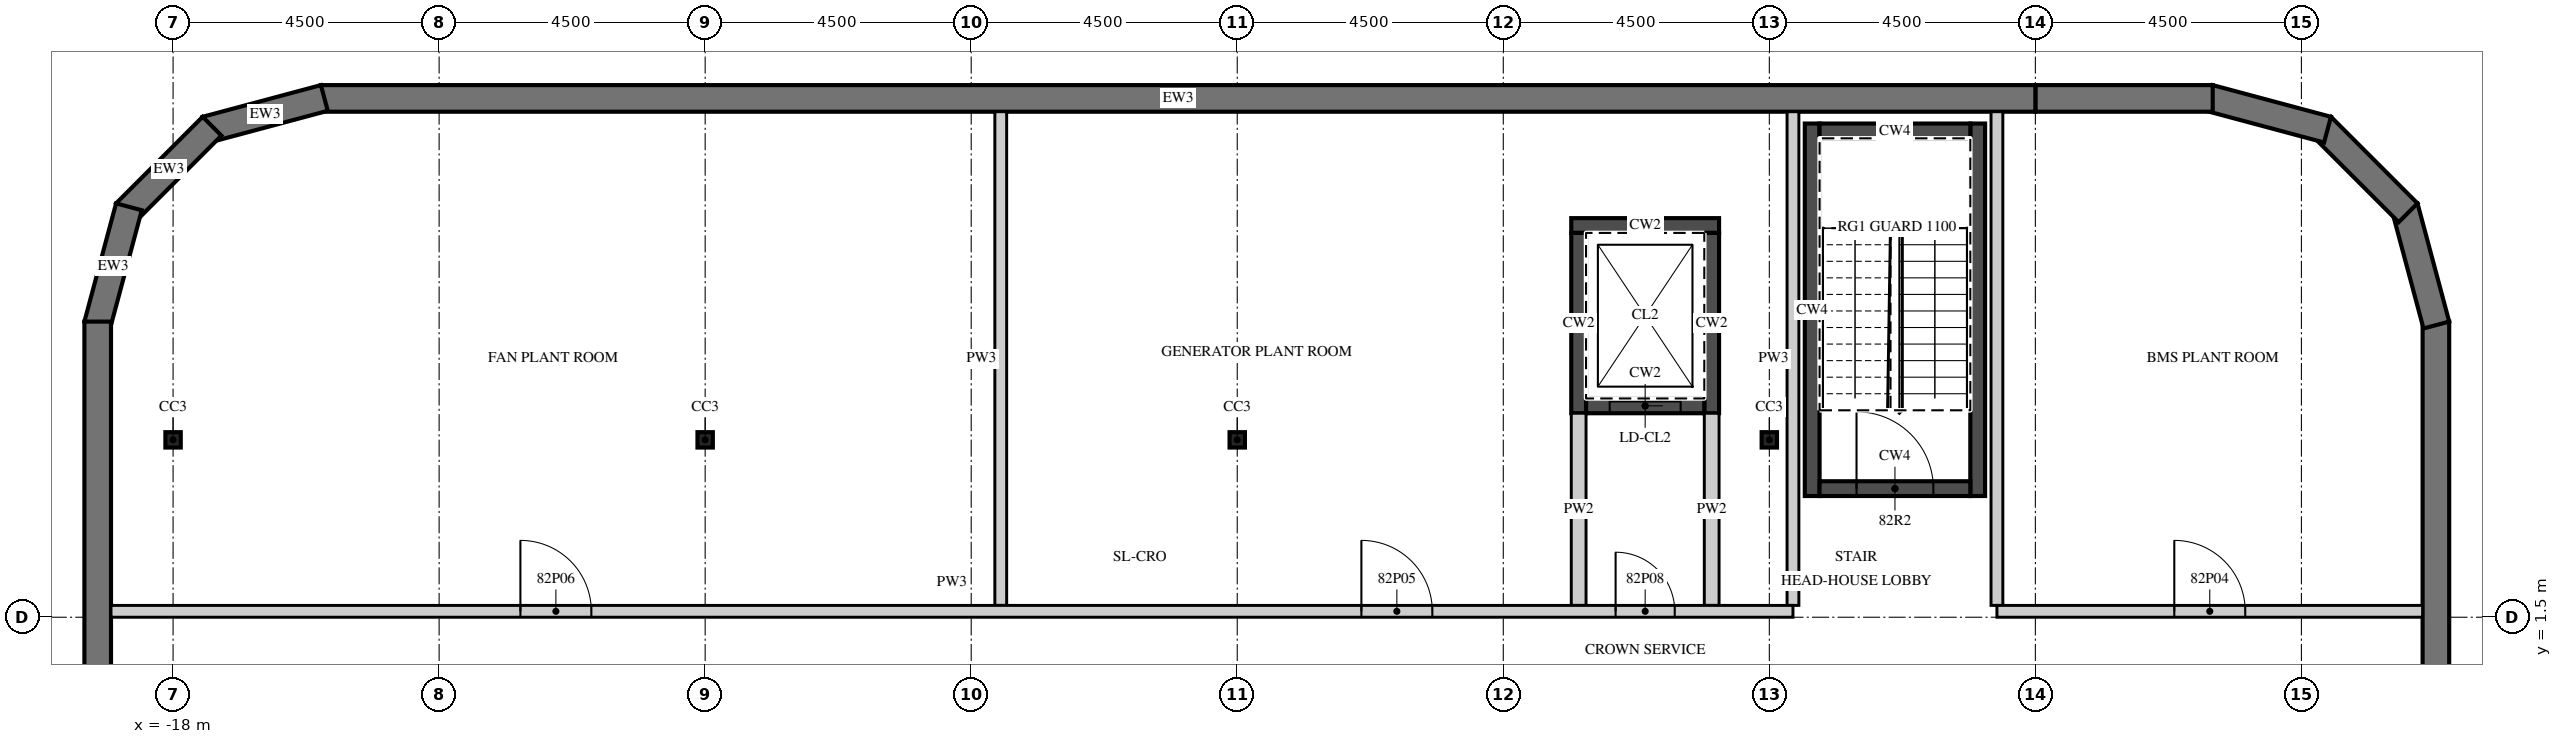
"""IFC4 building model, lengths in metres.
Left out: names, types, materials, properties, quantities, classifications, styles, units other than length and angle.
Written with IfcOpenShell. Run it as: python <this file> out.ifc"""

import sys

from ifc_helpers import new_model, si_unit, direction, frame, frame_2d, origin, origin_2d, place, context, subcontext, project, spatial, polyline, rectangle, i_section, outline, extrude, element, fill, save


model = new_model("IFC4")
c1 = context("Model", 3, precision=1e-05, world=origin(), true_north=direction((0.0, 1.0)))
c2 = subcontext(c1, "Body", "Model", "MODEL_VIEW")
j1 = project(units=[si_unit("LENGTHUNIT", "METRE"), si_unit("PLANEANGLEUNIT", "RADIAN")], contexts=[c1])
p1 = place(None, origin())
s1 = spatial("IfcSite", under=j1, at=p1, CompositionType="ELEMENT")
p2 = place(p1, origin())
s2 = spatial("IfcBuilding", under=s1, at=p2, CompositionType="ELEMENT")
p3 = place(p2, frame((0.0, 0.0, 325.8)))
s3 = spatial("IfcBuildingStorey", under=s2, at=p3, CompositionType="ELEMENT", Elevation=325.8)
for number, where, z_axis, x_axis in (
    (1, (-18.0, 4.5, 0.0), (0.0, 0.0, 1.0), (1.0, 0.0, 0.0)),
    (2, (-9.0, 4.5, 0.0), (0.0, 0.0, 1.0), (1.0, 0.0, 0.0)),
    (3, (0.0, 4.5, 0.0), (0.0, 0.0, 1.0), (1.0, 0.0, 0.0)),
    (4, (9.0, 4.5, 0.0), (0.0, 0.0, 1.0), (1.0, 0.0, 0.0)),
):
    element("IfcColumn", number, at=place(p3, frame(where, z_axis=z_axis, x_axis=x_axis)), inside=s3, PredefinedType="COLUMN", context=c2, shape_type="SweptSolid", body=[
        extrude(i_section(OverallWidth=0.26, OverallDepth=0.26, WebThickness=0.01, FlangeThickness=0.018, FilletRadius=0.024, at=origin_2d()), origin(), (0.0, 0.0, 1.0), 4.0),
    ])
p4 = place(p3, frame((20.275, -7.5, 0.0), z_axis=(0.0, 0.0, 1.0), x_axis=(0.0, 1.0, 0.0)))
e5 = element("IfcWall", 5, at=p4, inside=s3, PredefinedType="SOLIDWALL", context=c2, shape_type="SweptSolid", body=[
    extrude(rectangle(XDim=14.0, YDim=0.45, at=frame_2d((7.0, 0.0))), origin(), (0.0, 0.0, 1.0), 3.65),
])
p5 = place(p3, frame((20.283, 6.442, 0.0), z_axis=(0.0, 0.0, 1.0), x_axis=(-0.25881466832, 0.965926999034, 0.0)))
e6 = element("IfcWall", 6, at=p5, inside=s3, PredefinedType="SOLIDWALL", context=c2, shape_type="SweptSolid", body=[
    extrude(outline(polyline([(0.0, -0.225), (2.071, -0.225), (1.95, 0.225), (0.121, 0.225), (0.0, -0.225)])), origin(), (0.0, 0.0, 1.0), 3.65),
])
p6 = place(p3, frame((19.805, 8.341, 0.0), z_axis=(0.0, 0.0, 1.0), x_axis=(-0.707106781187, 0.707106781187, 0.0)))
e7 = element("IfcWall", 7, at=p6, inside=s3, PredefinedType="SOLIDWALL", context=c2, shape_type="SweptSolid", body=[
    extrude(outline(polyline([(0.0, -0.225), (2.071, -0.225), (1.95, 0.225), (0.121, 0.225), (0.0, -0.225)])), origin(), (0.0, 0.0, 1.0), 3.65),
])
p7 = place(p3, frame((18.442, 9.747, 0.0), z_axis=(0.0, 0.0, 1.0), x_axis=(-0.965926999034, 0.25881466832, 0.0)))
e8 = element("IfcWall", 8, at=p7, inside=s3, PredefinedType="SOLIDWALL", context=c2, shape_type="SweptSolid", body=[
    extrude(outline(polyline([(-0.0, -0.225), (2.07, -0.225), (1.95, 0.225), (0.12, 0.225), (-0.0, -0.225)])), origin(), (0.0, 0.0, 1.0), 3.65),
])
p8 = place(p3, frame((16.5, 10.275, 0.0), z_axis=(0.0, 0.0, 1.0), x_axis=(-1.0, 0.0, 0.0)))
e9 = element("IfcWall", 9, at=p8, inside=s3, PredefinedType="SOLIDWALL", context=c2, shape_type="SweptSolid", body=[
    extrude(rectangle(XDim=3.0, YDim=0.45, at=frame_2d((1.5, 0.0))), origin(), (0.0, 0.0, 1.0), 3.65),
])
p9 = place(p3, frame((13.5, 10.275, 0.0), z_axis=(0.0, 0.0, 1.0), x_axis=(-1.0, 0.0, 0.0)))
e10 = element("IfcWall", 10, at=p9, inside=s3, PredefinedType="SOLIDWALL", context=c2, shape_type="SweptSolid", body=[
    extrude(rectangle(XDim=29.0, YDim=0.45, at=frame_2d((14.5, 0.0))), origin(), (0.0, 0.0, 1.0), 3.65),
])
p10 = place(p3, frame((-15.442, 10.283, 0.0), z_axis=(0.0, 0.0, 1.0), x_axis=(-0.965926999034, -0.25881466832, 0.0)))
e11 = element("IfcWall", 11, at=p10, inside=s3, PredefinedType="SOLIDWALL", context=c2, shape_type="SweptSolid", body=[
    extrude(outline(polyline([(0.0, -0.225), (2.071, -0.225), (1.95, 0.225), (0.121, 0.225), (0.0, -0.225)])), origin(), (0.0, 0.0, 1.0), 3.65),
])
p11 = place(p3, frame((-17.341, 9.805, 0.0), z_axis=(0.0, 0.0, 1.0), x_axis=(-0.707106781187, -0.707106781187, 0.0)))
e12 = element("IfcWall", 12, at=p11, inside=s3, PredefinedType="SOLIDWALL", context=c2, shape_type="SweptSolid", body=[
    extrude(outline(polyline([(0.0, -0.225), (2.071, -0.225), (1.95, 0.225), (0.121, 0.225), (0.0, -0.225)])), origin(), (0.0, 0.0, 1.0), 3.65),
])
p12 = place(p3, frame((-18.747, 8.442, 0.0), z_axis=(0.0, 0.0, 1.0), x_axis=(-0.25881466832, -0.965926999034, 0.0)))
e13 = element("IfcWall", 13, at=p12, inside=s3, PredefinedType="SOLIDWALL", context=c2, shape_type="SweptSolid", body=[
    extrude(outline(polyline([(-0.0, -0.225), (2.07, -0.225), (1.95, 0.225), (0.12, 0.225), (-0.0, -0.225)])), origin(), (0.0, 0.0, 1.0), 3.65),
])
p13 = place(p3, frame((-19.275, 6.5, 0.0), z_axis=(0.0, 0.0, 1.0), x_axis=(0.0, -1.0, 0.0)))
e14 = element("IfcWall", 14, at=p13, inside=s3, PredefinedType="SOLIDWALL", context=c2, shape_type="SweptSolid", body=[
    extrude(rectangle(XDim=14.0, YDim=0.45, at=frame_2d((7.0, 0.0))), origin(), (0.0, 0.0, 1.0), 3.65),
])
p14 = place(p3, frame((5.65, 8.125, 0.0), z_axis=(0.0, 0.0, 1.0), x_axis=(1.0, 0.0, 0.0)))
e15 = element("IfcWall", 15, at=p14, inside=s3, PredefinedType="SHEAR", context=c2, shape_type="SweptSolid", body=[
    extrude(rectangle(XDim=2.5, YDim=0.25, at=frame_2d((1.25, 0.0))), origin(), (0.0, 0.0, 1.0), 3.4),
])
for number, where, z_axis, x_axis in (
    (16, (8.025, 4.95, 0.0), (0.0, 0.0, 1.0), (0.0, 1.0, 0.0)),
    (17, (5.775, 4.95, 0.0), (0.0, 0.0, 1.0), (0.0, 1.0, 0.0)),
):
    element("IfcWall", number, at=place(p3, frame(where, z_axis=z_axis, x_axis=x_axis)), inside=s3, PredefinedType="SHEAR", context=c2, shape_type="SweptSolid", body=[
        extrude(rectangle(XDim=3.05, YDim=0.25, at=frame_2d((1.525, 0.0))), origin(), (0.0, 0.0, 1.0), 3.4),
    ])
p15 = place(p3, frame((5.9, 5.075, 0.0), z_axis=(0.0, 0.0, 1.0), x_axis=(1.0, 0.0, 0.0)))
e18 = element("IfcWall", 18, at=p15, inside=s3, PredefinedType="SHEAR", context=c2, shape_type="SweptSolid", body=[
    extrude(rectangle(XDim=2.0, YDim=0.25, at=frame_2d((1.0, 0.0))), origin(), (0.0, 0.0, 1.0), 3.4),
])
p16 = place(p15, frame((0.4, 0.0, 0.0)))
e19 = element("IfcOpeningElement", 19, at=p16, cuts=e18, PredefinedType="OPENING", context=c2, shape_type="SweptSolid", body=[
    extrude(rectangle(XDim=1.2, YDim=2.1, at=frame_2d((0.6, 1.05))), frame((0.0, 0.135, 0.0), z_axis=(0.0, -1.0, 0.0), x_axis=(1.0, 0.0, 0.0)), (0.0, 0.0, 1.0), 0.27),
])
for number, where, z_axis, x_axis in (
    (20, (8.025, 1.7, 0.0), (0.0, 0.0, 1.0), (0.0, 1.0, 0.0)),
    (21, (5.775, 1.7, 0.0), (0.0, 0.0, 1.0), (0.0, 1.0, 0.0)),
):
    element("IfcWall", number, at=place(p3, frame(where, z_axis=z_axis, x_axis=x_axis)), inside=s3, PredefinedType="PARTITIONING", context=c2, shape_type="SweptSolid", body=[
        extrude(rectangle(XDim=3.25, YDim=0.25, at=frame_2d((1.625, 0.0))), origin(), (0.0, 0.0, 1.0), 3.4),
    ])
for number, where, z_axis, x_axis in (
    (22, (9.725, 3.55, 0.0), (0.0, 0.0, 1.0), (0.0, 1.0, 0.0)),
    (23, (12.525, 3.55, 0.0), (0.0, 0.0, 1.0), (0.0, 1.0, 0.0)),
):
    element("IfcWall", number, at=place(p3, frame(where, z_axis=z_axis, x_axis=x_axis)), inside=s3, PredefinedType="SHEAR", context=c2, shape_type="SweptSolid", body=[
        extrude(rectangle(XDim=6.3, YDim=0.25, at=frame_2d((3.15, 0.0))), origin(), (0.0, 0.0, 1.0), 3.65),
    ])
p17 = place(p3, frame((9.85, 9.725, 0.0), z_axis=(0.0, 0.0, 1.0), x_axis=(1.0, 0.0, 0.0)))
e24 = element("IfcWall", 24, at=p17, inside=s3, PredefinedType="SHEAR", context=c2, shape_type="SweptSolid", body=[
    extrude(rectangle(XDim=2.55, YDim=0.25, at=frame_2d((1.275, 0.0))), origin(), (0.0, 0.0, 1.0), 3.65),
])
p18 = place(p3, frame((9.85, 3.675, 0.0), z_axis=(0.0, 0.0, 1.0), x_axis=(1.0, 0.0, 0.0)))
e25 = element("IfcWall", 25, at=p18, inside=s3, PredefinedType="SHEAR", context=c2, shape_type="SweptSolid", body=[
    extrude(rectangle(XDim=2.55, YDim=0.25, at=frame_2d((1.275, 0.0))), origin(), (0.0, 0.0, 1.0), 3.65),
])
p19 = place(p18, frame((0.625, 0.0, 0.0)))
e26 = element("IfcOpeningElement", 26, at=p19, cuts=e25, PredefinedType="OPENING", context=c2, shape_type="SweptSolid", body=[
    extrude(rectangle(XDim=1.3, YDim=2.1, at=frame_2d((0.65, 1.05))), frame((0.0, 0.135, 0.0), z_axis=(0.0, -1.0, 0.0), x_axis=(1.0, 0.0, 0.0)), (0.0, 0.0, 1.0), 0.27),
])
for number, where, z_axis, x_axis in (
    (27, (12.85, 1.7, 0.0), (0.0, 0.0, 1.0), (0.0, 1.0, 0.0)),
    (28, (9.4, 1.7, 0.0), (0.0, 0.0, 1.0), (0.0, 1.0, 0.0)),
    (29, (-4.0, 1.7, 0.0), (0.0, 0.0, 1.0), (0.0, 1.0, 0.0)),
):
    element("IfcWall", number, at=place(p3, frame(where, z_axis=z_axis, x_axis=x_axis)), inside=s3, PredefinedType="PARTITIONING", context=c2, shape_type="SweptSolid", body=[
        extrude(rectangle(XDim=8.35, YDim=0.2, at=frame_2d((4.175, 0.0))), origin(), (0.0, 0.0, 1.0), 3.65),
    ])
p20 = place(p3, frame((12.85, 1.6, 0.0), z_axis=(0.0, 0.0, 1.0), x_axis=(1.0, 0.0, 0.0)))
e30 = element("IfcWall", 30, at=p20, inside=s3, PredefinedType="PARTITIONING", context=c2, shape_type="SweptSolid", body=[
    extrude(rectangle(XDim=7.2, YDim=0.2, at=frame_2d((3.6, 0.0))), origin(), (0.0, 0.0, 1.0), 3.65),
])
p21 = place(p20, frame((3.0, 0.0, 0.0)))
e31 = element("IfcOpeningElement", 31, at=p21, cuts=e30, PredefinedType="OPENING", context=c2, shape_type="SweptSolid", body=[
    extrude(rectangle(XDim=1.2, YDim=2.1, at=frame_2d((0.6, 1.05))), frame((0.0, 0.11, 0.0), z_axis=(0.0, -1.0, 0.0), x_axis=(1.0, 0.0, 0.0)), (0.0, 0.0, 1.0), 0.22),
])
p22 = place(p3, frame((-19.05, 1.6, 0.0), z_axis=(0.0, 0.0, 1.0), x_axis=(1.0, 0.0, 0.0)))
e32 = element("IfcWall", 32, at=p22, inside=s3, PredefinedType="PARTITIONING", context=c2, shape_type="SweptSolid", body=[
    extrude(rectangle(XDim=28.45, YDim=0.2, at=frame_2d((14.225, 0.0))), origin(), (0.0, 0.0, 1.0), 3.25),
])
p23 = place(p22, frame((21.15, 0.0, 0.0)))
e33 = element("IfcOpeningElement", 33, at=p23, cuts=e32, PredefinedType="OPENING", context=c2, shape_type="SweptSolid", body=[
    extrude(rectangle(XDim=1.2, YDim=2.1, at=frame_2d((0.6, 1.05))), frame((0.0, 0.11, 0.0), z_axis=(0.0, -1.0, 0.0), x_axis=(1.0, 0.0, 0.0)), (0.0, 0.0, 1.0), 0.22),
])
p24 = place(p22, frame((6.925, 0.0, 0.0)))
e34 = element("IfcOpeningElement", 34, at=p24, cuts=e32, PredefinedType="OPENING", context=c2, shape_type="SweptSolid", body=[
    extrude(rectangle(XDim=1.2, YDim=2.1, at=frame_2d((0.6, 1.05))), frame((0.0, 0.11, 0.0), z_axis=(0.0, -1.0, 0.0), x_axis=(1.0, 0.0, 0.0)), (0.0, 0.0, 1.0), 0.22),
])
p25 = place(p22, frame((25.45, 0.0, 0.0)))
e35 = element("IfcOpeningElement", 35, at=p25, cuts=e32, PredefinedType="OPENING", context=c2, shape_type="SweptSolid", body=[
    extrude(rectangle(XDim=1.0, YDim=2.1, at=frame_2d((0.5, 1.05))), frame((0.0, 0.11, 0.0), z_axis=(0.0, -1.0, 0.0), x_axis=(1.0, 0.0, 0.0)), (0.0, 0.0, 1.0), 0.22),
])
p26 = place(p16, origin())
e36 = element("IfcDoor", 36, at=p26, inside=s3, OperationType="SLIDING_TO_LEFT", PredefinedType="DOOR", context=c2, shape_type="SweptSolid", body=[
    extrude(rectangle(XDim=1.2, YDim=2.1, at=frame_2d((0.6, 1.05))), frame((0.0, 0.025, 0.0), z_axis=(0.0, -1.0, 0.0), x_axis=(1.0, 0.0, 0.0)), (0.0, 0.0, 1.0), 0.05),
])
fill(e19, e36)
p27 = place(p19, origin())
e37 = element("IfcDoor", 37, at=p27, inside=s3, OperationType="SINGLE_SWING_LEFT", PredefinedType="DOOR", context=c2, shape_type="SweptSolid", body=[
    extrude(rectangle(XDim=1.3, YDim=2.1, at=frame_2d((0.65, 1.05))), frame((0.0, 0.025, 0.0), z_axis=(0.0, -1.0, 0.0), x_axis=(1.0, 0.0, 0.0)), (0.0, 0.0, 1.0), 0.05),
])
fill(e26, e37)
p28 = place(p21, origin())
e38 = element("IfcDoor", 38, at=p28, inside=s3, OperationType="SINGLE_SWING_LEFT", PredefinedType="DOOR", context=c2, shape_type="SweptSolid", body=[
    extrude(rectangle(XDim=1.2, YDim=2.1, at=frame_2d((0.6, 1.05))), frame((0.0, 0.025, 0.0), z_axis=(0.0, -1.0, 0.0), x_axis=(1.0, 0.0, 0.0)), (0.0, 0.0, 1.0), 0.05),
])
fill(e31, e38)
p29 = place(p23, origin())
e39 = element("IfcDoor", 39, at=p29, inside=s3, OperationType="SINGLE_SWING_LEFT", PredefinedType="DOOR", context=c2, shape_type="SweptSolid", body=[
    extrude(rectangle(XDim=1.2, YDim=2.1, at=frame_2d((0.6, 1.05))), frame((0.0, 0.025, 0.0), z_axis=(0.0, -1.0, 0.0), x_axis=(1.0, 0.0, 0.0)), (0.0, 0.0, 1.0), 0.05),
])
fill(e33, e39)
p30 = place(p24, origin())
e40 = element("IfcDoor", 40, at=p30, inside=s3, OperationType="SINGLE_SWING_LEFT", PredefinedType="DOOR", context=c2, shape_type="SweptSolid", body=[
    extrude(rectangle(XDim=1.2, YDim=2.1, at=frame_2d((0.6, 1.05))), frame((0.0, 0.025, 0.0), z_axis=(0.0, -1.0, 0.0), x_axis=(1.0, 0.0, 0.0)), (0.0, 0.0, 1.0), 0.05),
])
fill(e34, e40)
p31 = place(p25, origin())
e41 = element("IfcDoor", 41, at=p31, inside=s3, OperationType="SINGLE_SWING_LEFT", PredefinedType="DOOR", context=c2, shape_type="SweptSolid", body=[
    extrude(rectangle(XDim=1.0, YDim=2.1, at=frame_2d((0.5, 1.05))), frame((0.0, 0.025, 0.0), z_axis=(0.0, -1.0, 0.0), x_axis=(1.0, 0.0, 0.0)), (0.0, 0.0, 1.0), 0.05),
])
fill(e35, e41)
save(model, sys.argv[1])
